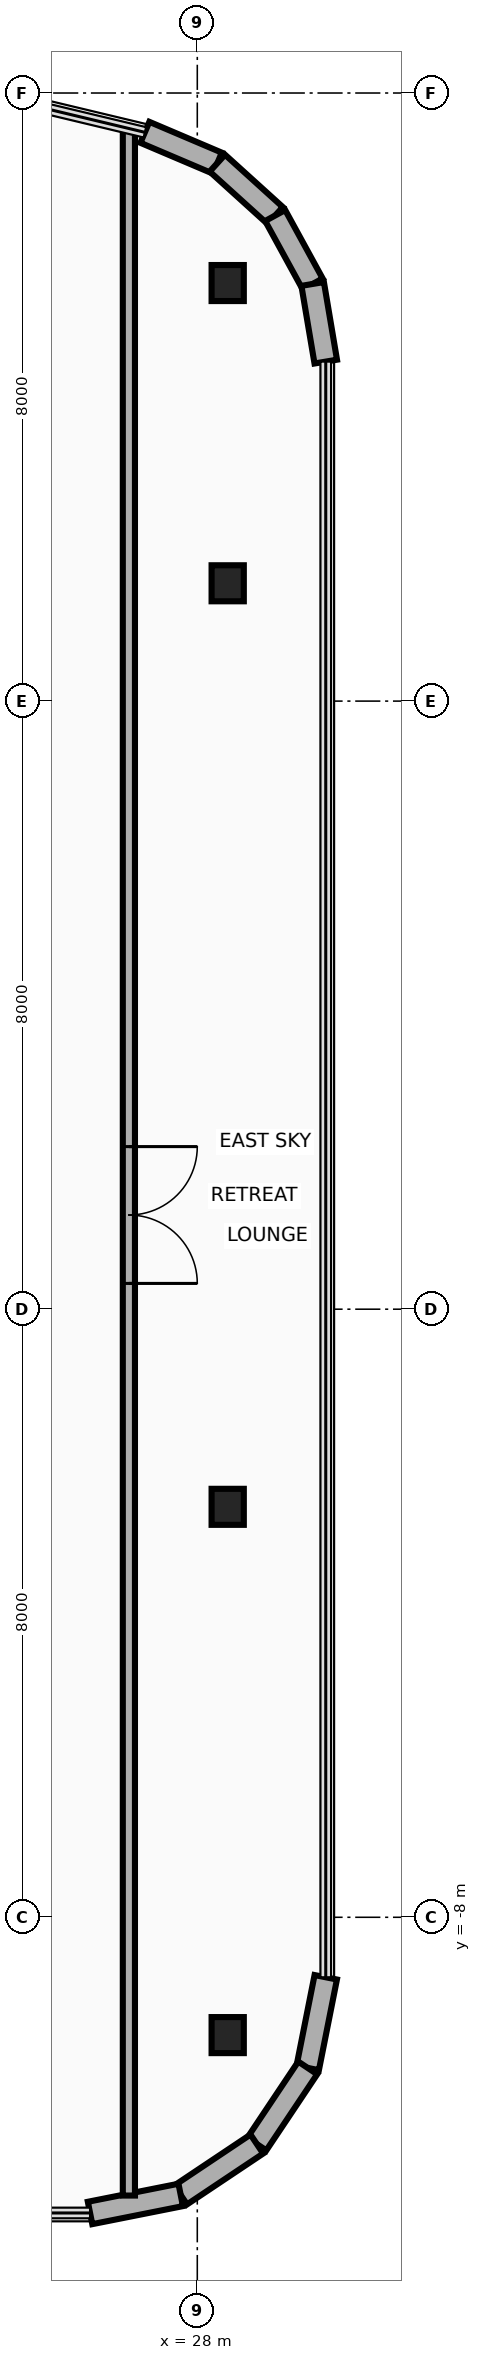
"""IFC4 building model, lengths in metres.
Left out: names, types, materials, properties, quantities, classifications, styles, units other than length and angle.
Written with IfcOpenShell. Run it as: python <this file> out.ifc"""

import sys

from ifc_helpers import new_model, si_unit, direction, frame, frame_2d, origin, origin_2d, place, context, subcontext, project, spatial, rectangle, i_section, extrude, source, transform, mapped, element, fill, save


model = new_model("IFC4")
c1 = context("Model", 3, precision=1e-05, world=origin(), true_north=direction((0.0, 1.0)))
c2 = subcontext(c1, "Body", "Model", "MODEL_VIEW")
j1 = project(units=[si_unit("LENGTHUNIT", "METRE"), si_unit("PLANEANGLEUNIT", "RADIAN")], contexts=[c1])
p1 = place(None, origin())
s1 = spatial("IfcSite", under=j1, at=p1, CompositionType="ELEMENT")
p2 = place(p1, origin())
s2 = spatial("IfcBuilding", under=s1, at=p2, CompositionType="ELEMENT")
p3 = place(p2, frame((0.0, 0.0, 101.1)))
s3 = spatial("IfcBuildingStorey", under=s2, at=p3, CompositionType="ELEMENT", Elevation=101.1)
m1 = source(origin(), c2, "Body", "SweptSolid", [
    extrude(i_section(OverallWidth=0.424, OverallDepth=0.474, WebThickness=0.048, FlangeThickness=0.077, at=origin_2d()), origin(), (0.0, 0.0, 1.0), 4.6),
])
for number, where, z_axis, x_axis in (
    (1, (28.4, -9.55, 0.0), (0.0, 0.0, 1.0), (1.0, 0.0, 0.0)),
    (2, (28.4, -2.6, 0.0), (0.0, 0.0, 1.0), (1.0, 0.0, 0.0)),
    (3, (28.4, 9.55, 0.0), (0.0, 0.0, 1.0), (1.0, 0.0, 0.0)),
    (4, (28.4, 13.5, 0.0), (0.0, 0.0, 1.0), (1.0, 0.0, 0.0)),
):
    element("IfcColumn", number, at=place(p3, frame(where, z_axis=z_axis, x_axis=x_axis)), inside=s3, PredefinedType="COLUMN", context=c2, shape_type="MappedRepresentation", body=[
        mapped(m1, transform((0.0, 0.0, 0.0), x_axis=(1.0, 0.0, 0.0), y_axis=(0.0, 1.0, 0.0), z_axis=(0.0, 0.0, 1.0), scale=1.0)),
    ])
p4 = place(p3, frame((27.31, 15.483, 0.0), z_axis=(0.0, 0.0, 1.0), x_axis=(0.920250328759, -0.391330208927, 0.0)))
e5 = element("IfcWall", 5, at=p4, inside=s3, PredefinedType="SOLIDWALL", context=c2, shape_type="SweptSolid", body=[
    extrude(rectangle(XDim=1.036, YDim=0.3, at=frame_2d((0.518, 0.0))), origin(), (0.0, 0.0, 1.0), 4.36),
])
p5 = place(p3, frame((28.264, 15.077, 0.0), z_axis=(0.0, 0.0, 1.0), x_axis=(0.741208839713, -0.671274501178, 0.0)))
e6 = element("IfcWall", 6, at=p5, inside=s3, PredefinedType="SOLIDWALL", context=c2, shape_type="SweptSolid", body=[
    extrude(rectangle(XDim=1.026, YDim=0.3, at=frame_2d((0.513, 0.0))), origin(), (0.0, 0.0, 1.0), 4.36),
])
p6 = place(p3, frame((29.025, 14.388, 0.0), z_axis=(0.0, 0.0, 1.0), x_axis=(0.480284137298, -0.87711296163, 0.0)))
e7 = element("IfcWall", 7, at=p6, inside=s3, PredefinedType="SOLIDWALL", context=c2, shape_type="SweptSolid", body=[
    extrude(rectangle(XDim=1.027, YDim=0.3, at=frame_2d((0.513, 0.0))), origin(), (0.0, 0.0, 1.0), 4.36),
])
p7 = place(p3, frame((29.518, 13.488, 0.0), z_axis=(0.0, 0.0, 1.0), x_axis=(0.166156796952, -0.986099345313, 0.0)))
e8 = element("IfcWall", 8, at=p7, inside=s3, PredefinedType="SOLIDWALL", context=c2, shape_type="SweptSolid", body=[
    extrude(rectangle(XDim=1.036, YDim=0.3, at=frame_2d((0.518, 0.0))), origin(), (0.0, 0.0, 1.0), 4.36),
])
p8 = place(p3, frame((29.69, -8.789, 0.0), z_axis=(0.0, 0.0, 1.0), x_axis=(-0.194996050505, -0.980804027463, 0.0)))
e9 = element("IfcWall", 9, at=p8, inside=s3, PredefinedType="SOLIDWALL", context=c2, shape_type="SweptSolid", body=[
    extrude(rectangle(XDim=1.216, YDim=0.3, at=frame_2d((0.608, 0.0))), origin(), (0.0, 0.0, 1.0), 4.36),
])
for number, where, z_axis, x_axis in (
    (10, (29.453, -9.982, 0.0), (0.0, 0.0, 1.0), (-0.556, -0.831, 0.0)),
    (11, (28.783, -10.983, 0.0), (0.0, 0.0, 1.0), (-0.831, -0.556, 0.0)),
):
    element("IfcWall", number, at=place(p3, frame(where, z_axis=z_axis, x_axis=x_axis)), inside=s3, PredefinedType="SOLIDWALL", context=c2, shape_type="SweptSolid", body=[
        extrude(rectangle(XDim=1.205, YDim=0.3, at=frame_2d((0.603, 0.0))), origin(), (0.0, 0.0, 1.0), 4.36),
    ])
p9 = place(p3, frame((27.782, -11.653, 0.0), z_axis=(0.0, 0.0, 1.0), x_axis=(-0.980811661072, -0.194957650543, 0.0)))
e12 = element("IfcWall", 12, at=p9, inside=s3, PredefinedType="SOLIDWALL", context=c2, shape_type="SweptSolid", body=[
    extrude(rectangle(XDim=1.216, YDim=0.3, at=frame_2d((0.608, 0.0))), origin(), (0.0, 0.0, 1.0), 4.36),
])
p10 = place(p3, frame((27.1, -11.661, 0.0), z_axis=(0.0, 0.0, 1.0), x_axis=(0.0, 1.0, 0.0)))
e13 = element("IfcWall", 13, at=p10, inside=s3, PredefinedType="PARTITIONING", context=c2, shape_type="SweptSolid", body=[
    extrude(rectangle(XDim=27.194, YDim=0.16, at=frame_2d((13.597, 0.0))), origin(), (0.0, 0.0, 1.0), 3.566),
])
p11 = place(p10, frame((12.0, 0.0, 0.0)))
e14 = element("IfcOpeningElement", 14, at=p11, cuts=e13, PredefinedType="OPENING", context=c2, shape_type="SweptSolid", body=[
    extrude(rectangle(XDim=1.8, YDim=2.15, at=frame_2d((0.9, 1.075))), frame((0.0, 0.095, 0.0), z_axis=(0.0, -1.0, 0.0), x_axis=(1.0, 0.0, 0.0)), (0.0, 0.0, 1.0), 0.19),
])
p12 = place(p11, frame((1.8, 0.0, 0.0), z_axis=(0.0, 0.0, 1.0), x_axis=(-1.0, 0.0, 0.0)))
e15 = element("IfcDoor", 15, at=p12, inside=s3, OperationType="DOUBLE_DOOR_SINGLE_SWING", PredefinedType="DOOR", context=c2, shape_type="SweptSolid", body=[
    extrude(rectangle(XDim=1.8, YDim=2.15, at=frame_2d((0.9, 1.075))), frame((0.0, 0.025, 0.0), z_axis=(0.0, -1.0, 0.0), x_axis=(1.0, 0.0, 0.0)), (0.0, 0.0, 1.0), 0.05),
])
fill(e14, e15)
save(model, sys.argv[1])
